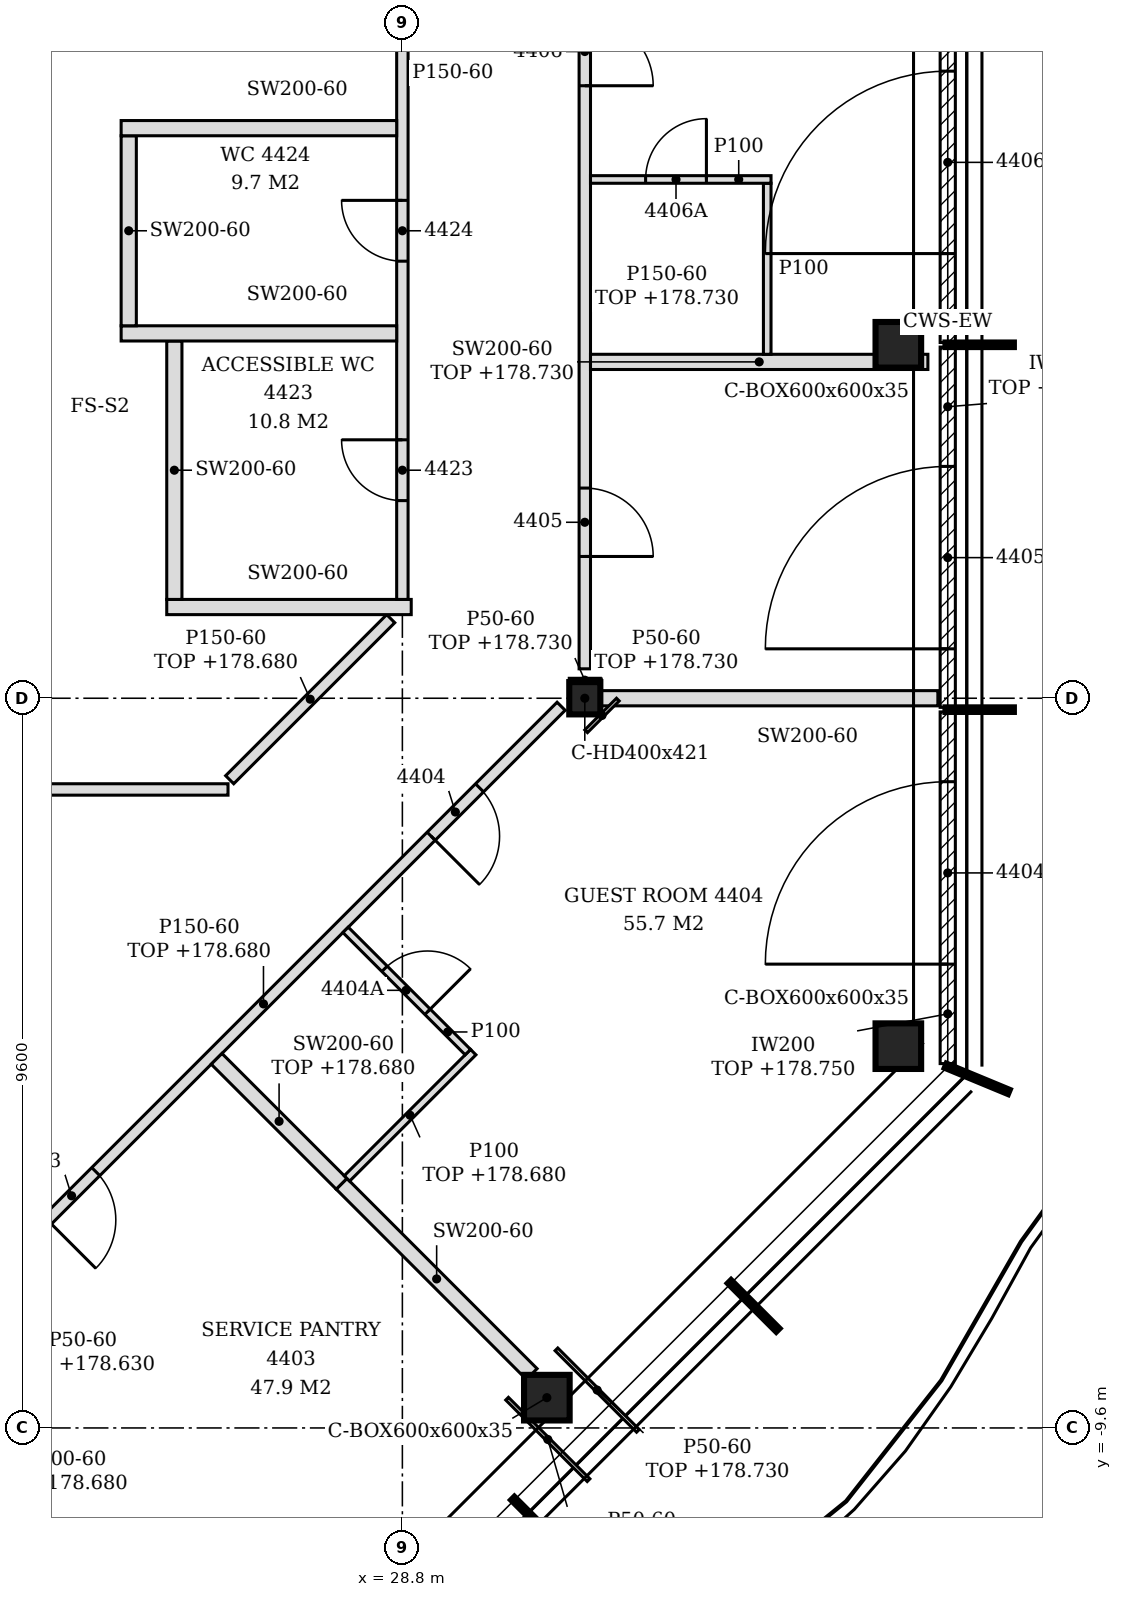
"""IFC4 building model, lengths in metres.
Left out: names, types, materials, properties, quantities, classifications, styles, units other than length and angle.
Written with IfcOpenShell. Run it as: python <this file> out.ifc"""

import sys

from ifc_helpers import new_model, si_unit, direction, frame, frame_2d, origin, origin_2d, place, context, subcontext, project, spatial, polyline, rectangle, hollow_rectangle, i_section, outline, extrude, clip, halfspace, element, fill, save


model = new_model("IFC4")
c1 = context("Model", 3, precision=1e-05, world=origin(), true_north=direction((0.0, 1.0)))
c2 = subcontext(c1, "Body", "Model", "MODEL_VIEW")
j1 = project(units=[si_unit("LENGTHUNIT", "METRE"), si_unit("PLANEANGLEUNIT", "RADIAN")], contexts=[c1])
p1 = place(None, origin())
s1 = spatial("IfcSite", under=j1, at=p1, CompositionType="ELEMENT")
p2 = place(p1, origin())
s2 = spatial("IfcBuilding", under=s1, at=p2, CompositionType="ELEMENT")
p3 = place(p2, frame((0.0, 0.0, 175.8)))
s3 = spatial("IfcBuildingStorey", under=s2, at=p3, CompositionType="ELEMENT", Elevation=175.8)
for number, where, z_axis, x_axis in (
    (1, (30.701, -9.201, -0.15), (0.183, -0.122, 0.976), (0.555, 0.832, 0.0)),
    (2, (35.325, -4.577, -0.15), (0.183, -0.122, 0.976), (0.555, 0.832, 0.0)),
    (3, (35.325, 4.65, -0.15), (0.183, -0.122, 0.976), (0.555, 0.832, 0.0)),
):
    element("IfcColumn", number, at=place(p3, frame(where, z_axis=z_axis, x_axis=x_axis)), inside=s3, PredefinedType="COLUMN", context=c2, shape_type="Clipping", body=[
        clip(clip(extrude(hollow_rectangle(XDim=0.6, YDim=0.6, WallThickness=0.035, at=origin_2d()), origin(), (0.0, 0.0, 1.0), 3.69), halfspace(frame((0.0, 0.0, 0.022), z_axis=(0.0, 0.0, 1.0), x_axis=(1.0, 0.0, 0.0)), True)), halfspace(frame((0.0, 0.0, 3.67), z_axis=(0.0, 0.0, 1.0), x_axis=(1.0, 0.0, 0.0)), False)),
    ])
p4 = place(p3, frame((31.2, 0.0, -0.15), z_axis=(0.0, 0.0, 1.0), x_axis=(1.0, 0.0, 0.0)))
e4 = element("IfcColumn", 4, at=p4, inside=s3, PredefinedType="COLUMN", context=c2, shape_type="SweptSolid", body=[
    extrude(i_section(OverallWidth=0.409, OverallDepth=0.425, WebThickness=0.033, FlangeThickness=0.052, FilletRadius=0.015, at=origin_2d()), origin(), (0.0, 0.0, 1.0), 3.6),
])
p5 = place(p3, frame((35.975, -4.806, 0.0), z_axis=(0.0, 0.0, 1.0), x_axis=(0.0, 1.0, 0.0)))
e5 = element("IfcWall", 5, at=p5, inside=s3, PredefinedType="NOTDEFINED", context=c2, shape_type="SweptSolid", body=[
    extrude(rectangle(XDim=4.626, YDim=0.2, at=frame_2d((2.313, 0.0))), origin(), (0.0, 0.0, 1.0), 2.95),
])
p6 = place(p5, frame((1.308, 0.0, 0.0)))
e6 = element("IfcOpeningElement", 6, at=p6, cuts=e5, PredefinedType="OPENING", context=c2, shape_type="SweptSolid", body=[
    extrude(rectangle(XDim=2.4, YDim=2.4, at=frame_2d((1.2, 1.2))), frame((0.0, 0.11, 0.0), z_axis=(0.0, -1.0, 0.0), x_axis=(1.0, 0.0, 0.0)), (0.0, 0.0, 1.0), 0.22),
])
p7 = place(p3, frame((35.975, -0.12, 0.0), z_axis=(0.0, 0.0, 1.0), x_axis=(0.0, 1.0, 0.0)))
e7 = element("IfcWall", 7, at=p7, inside=s3, PredefinedType="NOTDEFINED", context=c2, shape_type="SweptSolid", body=[
    extrude(rectangle(XDim=4.74, YDim=0.2, at=frame_2d((2.37, 0.0))), origin(), (0.0, 0.0, 1.0), 2.95),
])
p8 = place(p7, frame((0.77, 0.0, 0.0)))
e8 = element("IfcOpeningElement", 8, at=p8, cuts=e7, PredefinedType="OPENING", context=c2, shape_type="SweptSolid", body=[
    extrude(rectangle(XDim=2.4, YDim=2.4, at=frame_2d((1.2, 1.2))), frame((0.0, 0.11, 0.0), z_axis=(0.0, -1.0, 0.0), x_axis=(1.0, 0.0, 0.0)), (0.0, 0.0, 1.0), 0.22),
])
p9 = place(p3, frame((35.975, 4.68, 0.0), z_axis=(0.0, 0.0, 1.0), x_axis=(0.0, 1.0, 0.0)))
e9 = element("IfcWall", 9, at=p9, inside=s3, PredefinedType="NOTDEFINED", context=c2, shape_type="SweptSolid", body=[
    extrude(rectangle(XDim=4.74, YDim=0.2, at=frame_2d((2.37, 0.0))), origin(), (0.0, 0.0, 1.0), 2.95),
])
p10 = place(p9, frame((1.17, 0.0, 0.0)))
e10 = element("IfcOpeningElement", 10, at=p10, cuts=e9, PredefinedType="OPENING", context=c2, shape_type="SweptSolid", body=[
    extrude(rectangle(XDim=2.4, YDim=2.4, at=frame_2d((1.2, 1.2))), frame((0.0, 0.11, 0.0), z_axis=(0.0, -1.0, 0.0), x_axis=(1.0, 0.0, 0.0)), (0.0, 0.0, 1.0), 0.22),
])
p11 = place(p3, frame((25.878, -13.515, 0.0), z_axis=(0.0, 0.0, 1.0), x_axis=(-0.70708941033, 0.707124151617, 0.0)))
e11 = element("IfcWall", 11, at=p11, inside=s3, PredefinedType="PARTITIONING", context=c2, shape_type="SweptSolid", body=[
    extrude(rectangle(XDim=7.027, YDim=0.2, at=frame_2d((3.514, 0.0))), origin(), (0.0, 0.0, 1.0), 2.88),
])
p12 = place(p3, frame((30.502, -8.891, 0.0), z_axis=(0.0, 0.0, 1.0), x_axis=(-0.707003289526, 0.707210257702, 0.0)))
e12 = element("IfcWall", 12, at=p12, inside=s3, PredefinedType="PARTITIONING", context=c2, shape_type="SweptSolid", body=[
    extrude(rectangle(XDim=3.539, YDim=0.2, at=frame_2d((1.77, 0.0))), origin(), (0.0, 0.0, 1.0), 3.45),
])
p13 = place(p3, frame((22.722, -8.272, 0.0), z_axis=(0.0, 0.0, 1.0), x_axis=(0.707106781187, 0.707106781187, 0.0)))
e13 = element("IfcWall", 13, at=p13, inside=s3, PredefinedType="PARTITIONING", context=c2, shape_type="SweptSolid", body=[
    extrude(rectangle(XDim=11.549, YDim=0.15, at=frame_2d((5.774, 0.0))), origin(), (0.0, 0.0, 1.0), 2.88),
])
p14 = place(p13, frame((1.991, 0.0, 0.0)))
e14 = element("IfcOpeningElement", 14, at=p14, cuts=e13, PredefinedType="OPENING", context=c2, shape_type="SweptSolid", body=[
    extrude(rectangle(XDim=0.9, YDim=2.1, at=frame_2d((0.45, 1.05))), frame((0.0, 0.085, 0.0), z_axis=(0.0, -1.0, 0.0), x_axis=(1.0, 0.0, 0.0)), (0.0, 0.0, 1.0), 0.17),
])
p15 = place(p13, frame((9.131, 0.0, 0.0)))
e15 = element("IfcOpeningElement", 15, at=p15, cuts=e13, PredefinedType="OPENING", context=c2, shape_type="SweptSolid", body=[
    extrude(rectangle(XDim=0.9, YDim=2.1, at=frame_2d((0.45, 1.05))), frame((0.0, 0.085, 0.0), z_axis=(0.0, -1.0, 0.0), x_axis=(1.0, 0.0, 0.0)), (0.0, 0.0, 1.0), 0.17),
])
p16 = place(p3, frame((28.0, -6.388, 0.0), z_axis=(0.0, 0.0, 1.0), x_axis=(-0.707106781187, 0.707106781187, 0.0)))
e16 = element("IfcWall", 16, at=p16, inside=s3, PredefinedType="PARTITIONING", context=c2, shape_type="SweptSolid", body=[
    extrude(rectangle(XDim=2.325, YDim=0.2, at=frame_2d((1.163, 0.0))), origin(), (0.0, 0.0, 1.0), 2.88),
])
p17 = place(p3, frame((28.071, -6.317, 0.0), z_axis=(0.0, 0.0, 1.0), x_axis=(0.707106781187, 0.707106781187, 0.0)))
e17 = element("IfcWall", 17, at=p17, inside=s3, PredefinedType="PARTITIONING", context=c2, shape_type="SweptSolid", body=[
    extrude(rectangle(XDim=2.35, YDim=0.1, at=frame_2d((1.175, 0.0))), origin(), (0.0, 0.0, 1.0), 2.88),
])
p18 = place(p3, frame((29.662, -4.656, 0.0), z_axis=(0.0, 0.0, 1.0), x_axis=(-0.707160441348, 0.707053116953, 0.0)))
e18 = element("IfcWall", 18, at=p18, inside=s3, PredefinedType="PARTITIONING", context=c2, shape_type="SweptSolid", body=[
    extrude(rectangle(XDim=2.275, YDim=0.1, at=frame_2d((1.137, 0.0))), origin(), (0.0, 0.0, 1.0), 3.45),
])
p19 = place(p18, frame((0.75, 0.0, 0.0)))
e19 = element("IfcOpeningElement", 19, at=p19, cuts=e18, PredefinedType="OPENING", context=c2, shape_type="SweptSolid", body=[
    extrude(rectangle(XDim=0.8, YDim=2.1, at=frame_2d((0.4, 1.05))), frame((0.0, 0.06, 0.0), z_axis=(0.0, -1.0, 0.0), x_axis=(1.0, 0.0, 0.0)), (0.0, 0.0, 1.0), 0.12),
])
p20 = place(p3, frame((19.125, -1.2, 0.0), z_axis=(0.0, 0.0, 1.0), x_axis=(1.0, 0.0, 0.0)))
e20 = element("IfcWall", 20, at=p20, inside=s3, PredefinedType="PARTITIONING", context=c2, shape_type="SweptSolid", body=[
    extrude(outline(polyline([(0.0, 0.0), (7.381, 0.0), (7.381, 3.45), (0.225, 3.45), (0.223, 2.83), (0.0, 2.83), (0.0, 0.0)])), frame((0.0, 0.075, 0.0), z_axis=(0.0, -1.0, 0.0), x_axis=(1.0, 0.0, 0.0)), (0.0, 0.0, 1.0), 0.15),
])
p21 = place(p3, frame((26.528, -1.072, 0.0), z_axis=(0.0, 0.0, 1.0), x_axis=(0.707106781187, 0.707106781187, 0.0)))
e21 = element("IfcWall", 21, at=p21, inside=s3, PredefinedType="PARTITIONING", context=c2, shape_type="SweptSolid", body=[
    extrude(rectangle(XDim=2.997, YDim=0.15, at=frame_2d((1.498, 0.0))), origin(), (0.0, 0.0, 1.0), 2.88),
])
p22 = place(p3, frame((31.405, 0.0, 0.0), z_axis=(0.0, 0.0, 1.0), x_axis=(1.0, 0.0, 0.0)))
e22 = element("IfcWall", 22, at=p22, inside=s3, PredefinedType="PARTITIONING", context=c2, shape_type="SweptSolid", body=[
    extrude(rectangle(XDim=4.44, YDim=0.2, at=frame_2d((2.22, 0.0))), origin(), (0.0, 0.0, 1.0), 3.45),
])
p23 = place(p3, frame((31.2, 0.387, 0.0), z_axis=(0.0, 0.0, 1.0), x_axis=(0.0, 1.0, 0.0)))
e23 = element("IfcWall", 23, at=p23, inside=s3, PredefinedType="PARTITIONING", context=c2, shape_type="SweptSolid", body=[
    extrude(rectangle(XDim=9.0, YDim=0.15, at=frame_2d((4.5, 0.0))), origin(), (0.0, 0.0, 1.0), 2.93),
])
p24 = place(p23, frame((1.478, 0.0, 0.0)))
e24 = element("IfcOpeningElement", 24, at=p24, cuts=e23, PredefinedType="OPENING", context=c2, shape_type="SweptSolid", body=[
    extrude(rectangle(XDim=0.9, YDim=2.1, at=frame_2d((0.45, 1.05))), frame((0.0, 0.085, 0.0), z_axis=(0.0, -1.0, 0.0), x_axis=(1.0, 0.0, 0.0)), (0.0, 0.0, 1.0), 0.17),
])
p25 = place(p23, frame((7.671, 0.0, 0.0)))
e25 = element("IfcOpeningElement", 25, at=p25, cuts=e23, PredefinedType="OPENING", context=c2, shape_type="SweptSolid", body=[
    extrude(rectangle(XDim=0.9, YDim=2.1, at=frame_2d((0.45, 1.05))), frame((0.0, 0.085, 0.0), z_axis=(0.0, -1.0, 0.0), x_axis=(1.0, 0.0, 0.0)), (0.0, 0.0, 1.0), 0.17),
])
p26 = place(p3, frame((25.7, 1.2, 0.0), z_axis=(0.0, 0.0, 1.0), x_axis=(1.0, 0.0, 0.0)))
e26 = element("IfcWall", 26, at=p26, inside=s3, PredefinedType="PARTITIONING", context=c2, shape_type="SweptSolid", body=[
    extrude(rectangle(XDim=3.217, YDim=0.2, at=frame_2d((1.608, 0.0))), origin(), (0.0, 0.0, 1.0), 3.45),
])
p27 = place(p3, frame((25.8, 1.3, 0.0), z_axis=(0.0, 0.0, 1.0), x_axis=(0.0, 1.0, 0.0)))
e27 = element("IfcWall", 27, at=p27, inside=s3, PredefinedType="PARTITIONING", context=c2, shape_type="SweptSolid", body=[
    extrude(outline(polyline([(0.0, 0.0), (3.4, 0.0), (3.4, 3.45), (3.005, 3.45), (3.003, 2.88), (2.795, 2.88), (2.793, 3.45), (0.0, 3.45), (0.0, 0.0)])), frame((0.0, 0.1, 0.0), z_axis=(0.0, -1.0, 0.0), x_axis=(1.0, 0.0, 0.0)), (0.0, 0.0, 1.0), 0.2),
])
p28 = place(p3, frame((28.8, 1.3, 0.0), z_axis=(0.0, 0.0, 1.0), x_axis=(0.0, 1.0, 0.0)))
e28 = element("IfcWall", 28, at=p28, inside=s3, PredefinedType="PARTITIONING", context=c2, shape_type="SweptSolid", body=[
    extrude(outline(polyline([(0.0, 0.0), (8.602, 0.0), (8.602, 3.45), (7.805, 3.45), (7.803, 2.88), (7.595, 2.88), (7.593, 3.45), (3.005, 3.45), (3.003, 2.88), (2.795, 2.88), (2.793, 3.45), (0.0, 3.45), (0.0, 0.0)])), frame((0.0, 0.075, 0.0), z_axis=(0.0, -1.0, 0.0), x_axis=(1.0, 0.0, 0.0)), (0.0, 0.0, 1.0), 0.15),
])
p29 = place(p28, frame((1.3, 0.0, 0.0)))
e29 = element("IfcOpeningElement", 29, at=p29, cuts=e28, PredefinedType="OPENING", context=c2, shape_type="SweptSolid", body=[
    extrude(rectangle(XDim=0.8, YDim=2.1, at=frame_2d((0.4, 1.05))), frame((0.0, 0.085, 0.0), z_axis=(0.0, -1.0, 0.0), x_axis=(1.0, 0.0, 0.0)), (0.0, 0.0, 1.0), 0.17),
])
p30 = place(p28, frame((4.45, 0.0, 0.0)))
e30 = element("IfcOpeningElement", 30, at=p30, cuts=e28, PredefinedType="OPENING", context=c2, shape_type="SweptSolid", body=[
    extrude(rectangle(XDim=0.8, YDim=2.1, at=frame_2d((0.4, 1.05))), frame((0.0, 0.085, 0.0), z_axis=(0.0, -1.0, 0.0), x_axis=(1.0, 0.0, 0.0)), (0.0, 0.0, 1.0), 0.17),
])
p31 = place(p3, frame((31.275, 4.425, 0.0), z_axis=(0.0, 0.0, 1.0), x_axis=(1.0, 0.0, 0.0)))
e31 = element("IfcWall", 31, at=p31, inside=s3, PredefinedType="PARTITIONING", context=c2, shape_type="SweptSolid", body=[
    extrude(outline(polyline([(0.0, 0.0), (3.697, 0.0), (3.817, 0.863), (3.979, 1.725), (4.205, 2.587), (4.298, 2.93), (0.0, 2.93), (0.0, 2.587), (0.0, 1.725), (0.0, 0.863), (0.0, 0.0)])), frame((0.0, 0.1, 0.0), z_axis=(0.0, -1.0, 0.0), x_axis=(1.0, 0.0, 0.0)), (0.0, 0.0, 1.0), 0.2),
])
p32 = place(p3, frame((33.6, 4.525, 0.0), z_axis=(0.0, 0.0, 1.0), x_axis=(0.0, 1.0, 0.0)))
e32 = element("IfcWall", 32, at=p32, inside=s3, PredefinedType="PARTITIONING", context=c2, shape_type="SweptSolid", body=[
    extrude(rectangle(XDim=2.25, YDim=0.1, at=frame_2d((1.125, 0.0))), origin(), (0.0, 0.0, 1.0), 3.45),
])
p33 = place(p3, frame((25.1, 4.8, 0.0), z_axis=(0.0, 0.0, 1.0), x_axis=(1.0, 0.0, 0.0)))
e33 = element("IfcWall", 33, at=p33, inside=s3, PredefinedType="PARTITIONING", context=c2, shape_type="SweptSolid", body=[
    extrude(rectangle(XDim=3.625, YDim=0.2, at=frame_2d((1.812, 0.0))), origin(), (0.0, 0.0, 1.0), 3.45),
])
p34 = place(p3, frame((25.2, 4.9, 0.0), z_axis=(0.0, 0.0, 1.0), x_axis=(0.0, 1.0, 0.0)))
e34 = element("IfcWall", 34, at=p34, inside=s3, PredefinedType="PARTITIONING", context=c2, shape_type="SweptSolid", body=[
    extrude(rectangle(XDim=2.5, YDim=0.2, at=frame_2d((1.25, 0.0))), origin(), (0.0, 0.0, 1.0), 3.45),
])
p35 = place(p3, frame((31.275, 6.825, 0.0), z_axis=(0.0, 0.0, 1.0), x_axis=(1.0, 0.0, 0.0)))
e35 = element("IfcWall", 35, at=p35, inside=s3, PredefinedType="PARTITIONING", context=c2, shape_type="SweptSolid", body=[
    extrude(outline(polyline([(0.0, 0.0), (2.375, 0.0), (2.375, 3.45), (0.075, 3.45), (0.073, 2.93), (0.0, 2.93), (0.0, 0.0)])), frame((0.0, 0.05, 0.0), z_axis=(0.0, -1.0, 0.0), x_axis=(1.0, 0.0, 0.0)), (0.0, 0.0, 1.0), 0.1),
])
p36 = place(p35, frame((0.725, 0.0, 0.0)))
e36 = element("IfcOpeningElement", 36, at=p36, cuts=e35, PredefinedType="OPENING", context=c2, shape_type="SweptSolid", body=[
    extrude(rectangle(XDim=0.8, YDim=2.1, at=frame_2d((0.4, 1.05))), frame((0.0, 0.06, 0.0), z_axis=(0.0, -1.0, 0.0), x_axis=(1.0, 0.0, 0.0)), (0.0, 0.0, 1.0), 0.12),
])
p37 = place(p3, frame((25.1, 7.5, 0.0), z_axis=(0.0, 0.0, 1.0), x_axis=(1.0, 0.0, 0.0)))
e37 = element("IfcWall", 37, at=p37, inside=s3, PredefinedType="PARTITIONING", context=c2, shape_type="SweptSolid", body=[
    extrude(rectangle(XDim=3.625, YDim=0.2, at=frame_2d((1.812, 0.0))), origin(), (0.0, 0.0, 1.0), 3.45),
])
p38 = place(p3, frame((31.899, -9.638, 0.0), z_axis=(0.0, 0.0, 1.0), x_axis=(-0.70694576405, 0.707267761665, 0.0)))
e38 = element("IfcWall", 38, at=p38, inside=s3, PredefinedType="PARTITIONING", context=c2, shape_type="SweptSolid", body=[
    extrude(rectangle(XDim=1.516, YDim=0.05, at=frame_2d((0.758, 0.0))), origin(), (0.0, 0.0, 1.0), 2.93),
])
p39 = place(p3, frame((31.25, -10.287, 0.0), z_axis=(0.0, 0.0, 1.0), x_axis=(-0.70694576405, 0.707267761665, 0.0)))
e39 = element("IfcWall", 39, at=p39, inside=s3, PredefinedType="PARTITIONING", context=c2, shape_type="SweptSolid", body=[
    extrude(rectangle(XDim=1.516, YDim=0.05, at=frame_2d((0.758, 0.0))), origin(), (0.0, 0.0, 1.0), 2.63),
])
p40 = place(p3, frame((31.218, -0.435, 0.0), z_axis=(0.0, 0.0, 1.0), x_axis=(0.706899813022, 0.70731368879, 0.0)))
e40 = element("IfcWall", 40, at=p40, inside=s3, PredefinedType="PARTITIONING", context=c2, shape_type="SweptSolid", body=[
    extrude(rectangle(XDim=0.59, YDim=0.05, at=frame_2d((0.295, 0.0))), origin(), (0.0, 0.0, 1.0), 2.93),
])
p41 = place(p3, frame((30.996, 0.238, 0.0), z_axis=(0.0, 0.0, 1.0), x_axis=(1.0, 0.0, 0.0)))
e41 = element("IfcWall", 41, at=p41, inside=s3, PredefinedType="PARTITIONING", context=c2, shape_type="SweptSolid", body=[
    extrude(rectangle(XDim=0.409, YDim=0.05, at=frame_2d((0.205, 0.0))), origin(), (0.0, 0.0, 1.0), 2.93),
])
p42 = place(p6, origin())
e42 = element("IfcDoor", 42, at=p42, inside=s3, OperationType="SINGLE_SWING_LEFT", PredefinedType="DOOR", context=c2, shape_type="SweptSolid", body=[
    extrude(rectangle(XDim=2.4, YDim=2.4, at=frame_2d((1.2, 1.2))), frame((0.0, 0.025, 0.0), z_axis=(0.0, -1.0, 0.0), x_axis=(1.0, 0.0, 0.0)), (0.0, 0.0, 1.0), 0.05),
])
fill(e6, e42)
p43 = place(p8, origin())
e43 = element("IfcDoor", 43, at=p43, inside=s3, OperationType="SINGLE_SWING_LEFT", PredefinedType="DOOR", context=c2, shape_type="SweptSolid", body=[
    extrude(rectangle(XDim=2.4, YDim=2.4, at=frame_2d((1.2, 1.2))), frame((0.0, 0.025, 0.0), z_axis=(0.0, -1.0, 0.0), x_axis=(1.0, 0.0, 0.0)), (0.0, 0.0, 1.0), 0.05),
])
fill(e8, e43)
p44 = place(p10, origin())
e44 = element("IfcDoor", 44, at=p44, inside=s3, OperationType="SINGLE_SWING_LEFT", PredefinedType="DOOR", context=c2, shape_type="SweptSolid", body=[
    extrude(rectangle(XDim=2.4, YDim=2.4, at=frame_2d((1.2, 1.2))), frame((0.0, 0.025, 0.0), z_axis=(0.0, -1.0, 0.0), x_axis=(1.0, 0.0, 0.0)), (0.0, 0.0, 1.0), 0.05),
])
fill(e10, e44)
p45 = place(p14, frame((0.9, 0.0, 0.0), z_axis=(0.0, 0.0, 1.0), x_axis=(-1.0, 0.0, 0.0)))
e45 = element("IfcDoor", 45, at=p45, inside=s3, OperationType="SINGLE_SWING_RIGHT", PredefinedType="DOOR", context=c2, shape_type="SweptSolid", body=[
    extrude(rectangle(XDim=0.9, YDim=2.1, at=frame_2d((0.45, 1.05))), frame((0.0, 0.025, 0.0), z_axis=(0.0, -1.0, 0.0), x_axis=(1.0, 0.0, 0.0)), (0.0, 0.0, 1.0), 0.05),
])
fill(e14, e45)
p46 = place(p15, frame((0.9, 0.0, 0.0), z_axis=(0.0, 0.0, 1.0), x_axis=(-1.0, 0.0, 0.0)))
e46 = element("IfcDoor", 46, at=p46, inside=s3, OperationType="SINGLE_SWING_RIGHT", PredefinedType="DOOR", context=c2, shape_type="SweptSolid", body=[
    extrude(rectangle(XDim=0.9, YDim=2.1, at=frame_2d((0.45, 1.05))), frame((0.0, 0.025, 0.0), z_axis=(0.0, -1.0, 0.0), x_axis=(1.0, 0.0, 0.0)), (0.0, 0.0, 1.0), 0.05),
])
fill(e15, e46)
p47 = place(p19, frame((0.8, 0.0, 0.0), z_axis=(0.0, 0.0, 1.0), x_axis=(-1.0, 0.0, 0.0)))
e47 = element("IfcDoor", 47, at=p47, inside=s3, OperationType="SINGLE_SWING_RIGHT", PredefinedType="DOOR", context=c2, shape_type="SweptSolid", body=[
    extrude(rectangle(XDim=0.8, YDim=2.1, at=frame_2d((0.4, 1.05))), frame((0.0, 0.025, 0.0), z_axis=(0.0, -1.0, 0.0), x_axis=(1.0, 0.0, 0.0)), (0.0, 0.0, 1.0), 0.05),
])
fill(e19, e47)
p48 = place(p24, frame((0.9, 0.0, 0.0), z_axis=(0.0, 0.0, 1.0), x_axis=(-1.0, 0.0, 0.0)))
e48 = element("IfcDoor", 48, at=p48, inside=s3, OperationType="SINGLE_SWING_RIGHT", PredefinedType="DOOR", context=c2, shape_type="SweptSolid", body=[
    extrude(rectangle(XDim=0.9, YDim=2.1, at=frame_2d((0.45, 1.05))), frame((0.0, 0.025, 0.0), z_axis=(0.0, -1.0, 0.0), x_axis=(1.0, 0.0, 0.0)), (0.0, 0.0, 1.0), 0.05),
])
fill(e24, e48)
p49 = place(p25, frame((0.9, 0.0, 0.0), z_axis=(0.0, 0.0, 1.0), x_axis=(-1.0, 0.0, 0.0)))
e49 = element("IfcDoor", 49, at=p49, inside=s3, OperationType="SINGLE_SWING_RIGHT", PredefinedType="DOOR", context=c2, shape_type="SweptSolid", body=[
    extrude(rectangle(XDim=0.9, YDim=2.1, at=frame_2d((0.45, 1.05))), frame((0.0, 0.025, 0.0), z_axis=(0.0, -1.0, 0.0), x_axis=(1.0, 0.0, 0.0)), (0.0, 0.0, 1.0), 0.05),
])
fill(e25, e49)
p50 = place(p36, origin())
e50 = element("IfcDoor", 50, at=p50, inside=s3, OperationType="SINGLE_SWING_RIGHT", PredefinedType="DOOR", context=c2, shape_type="SweptSolid", body=[
    extrude(rectangle(XDim=0.8, YDim=2.1, at=frame_2d((0.4, 1.05))), frame((0.0, 0.025, 0.0), z_axis=(0.0, -1.0, 0.0), x_axis=(1.0, 0.0, 0.0)), (0.0, 0.0, 1.0), 0.05),
])
fill(e36, e50)
p51 = place(p29, origin())
e51 = element("IfcDoor", 51, at=p51, inside=s3, OperationType="SINGLE_SWING_RIGHT", PredefinedType="DOOR", context=c2, shape_type="SweptSolid", body=[
    extrude(rectangle(XDim=0.8, YDim=2.1, at=frame_2d((0.4, 1.05))), frame((0.0, 0.025, 0.0), z_axis=(0.0, -1.0, 0.0), x_axis=(1.0, 0.0, 0.0)), (0.0, 0.0, 1.0), 0.05),
])
fill(e29, e51)
p52 = place(p30, origin())
e52 = element("IfcDoor", 52, at=p52, inside=s3, OperationType="SINGLE_SWING_RIGHT", PredefinedType="DOOR", context=c2, shape_type="SweptSolid", body=[
    extrude(rectangle(XDim=0.8, YDim=2.1, at=frame_2d((0.4, 1.05))), frame((0.0, 0.025, 0.0), z_axis=(0.0, -1.0, 0.0), x_axis=(1.0, 0.0, 0.0)), (0.0, 0.0, 1.0), 0.05),
])
fill(e30, e52)
save(model, sys.argv[1])
